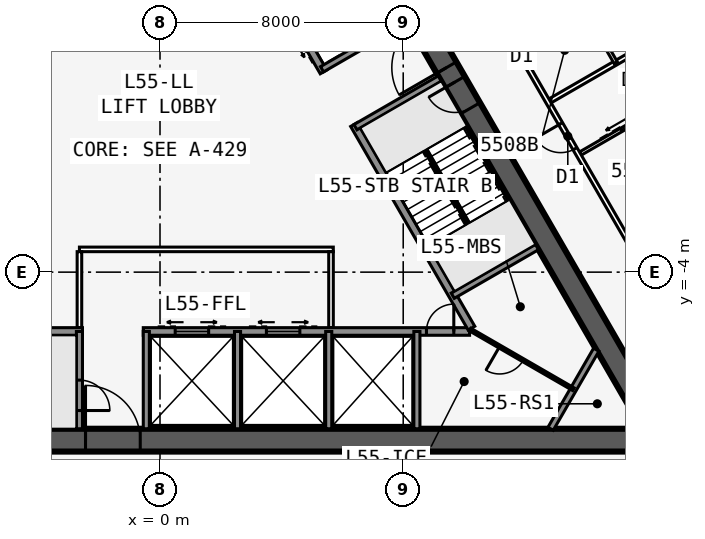
"""IFC4 building model, lengths in metres.
Left out: names, types, materials, properties, quantities, classifications, styles, units other than length and angle.
Written with IfcOpenShell. Run it as: python <this file> out.ifc"""

import sys

from ifc_helpers import new_model, si_unit, direction, frame, frame_2d, origin, place, context, subcontext, project, spatial, rectangle, extrude, element, fill, save


model = new_model("IFC4")
c1 = context("Model", 3, precision=1e-05, world=origin(), true_north=direction((0.0, 1.0)))
c2 = subcontext(c1, "Body", "Model", "MODEL_VIEW")
j1 = project(units=[si_unit("LENGTHUNIT", "METRE"), si_unit("PLANEANGLEUNIT", "RADIAN")], contexts=[c1])
p1 = place(None, origin())
s1 = spatial("IfcSite", under=j1, at=p1, CompositionType="ELEMENT")
p2 = place(p1, origin())
s2 = spatial("IfcBuilding", under=s1, at=p2, CompositionType="ELEMENT")
p3 = place(p2, frame((0.0, 0.0, 208.1)))
s3 = spatial("IfcBuildingStorey", under=s2, at=p3, CompositionType="ELEMENT", Elevation=208.1)
p4 = place(p3, frame((-16.5, -9.526, 0.0), z_axis=(0.0, 0.0, 1.0), x_axis=(1.0, 0.0, 0.0)))
e1 = element("IfcWall", 1, at=p4, inside=s3, PredefinedType="SHEAR", context=c2, shape_type="SweptSolid", body=[
    extrude(rectangle(XDim=33.0, YDim=0.75, at=frame_2d((16.5, 0.0))), origin(), (0.0, 0.0, 1.0), 3.6),
])
p5 = place(p4, frame((14.05, 0.0, 0.0)))
e2 = element("IfcOpeningElement", 2, at=p5, cuts=e1, PredefinedType="OPENING", context=c2, shape_type="SweptSolid", body=[
    extrude(rectangle(XDim=1.8, YDim=2.13, at=frame_2d((0.9, 1.065))), frame((0.0, 0.385, 0.0), z_axis=(0.0, -1.0, 0.0), x_axis=(1.0, 0.0, 0.0)), (0.0, 0.0, 1.0), 0.77),
])
p6 = place(p3, frame((-10.183, -5.951, 0.0), z_axis=(0.0, 0.0, 1.0), x_axis=(1.0, 0.0, 0.0)))
e3 = element("IfcWall", 3, at=p6, inside=s3, PredefinedType="SOLIDWALL", context=c2, shape_type="SweptSolid", body=[
    extrude(rectangle(XDim=7.633, YDim=0.25, at=frame_2d((3.816, 0.0))), origin(), (0.0, 0.0, 1.0), 3.435),
])
p7 = place(p3, frame((-0.55, -5.951, 0.0), z_axis=(0.0, 0.0, 1.0), x_axis=(1.0, 0.0, 0.0)))
e4 = element("IfcWall", 4, at=p7, inside=s3, PredefinedType="SOLIDWALL", context=c2, shape_type="SweptSolid", body=[
    extrude(rectangle(XDim=10.733, YDim=0.25, at=frame_2d((5.366, 0.0))), origin(), (0.0, 0.0, 1.0), 3.435),
])
p8 = place(p7, frame((9.314, 0.0, 0.0)))
e5 = element("IfcOpeningElement", 5, at=p8, cuts=e4, PredefinedType="OPENING", context=c2, shape_type="SweptSolid", body=[
    extrude(rectangle(XDim=0.9, YDim=2.13, at=frame_2d((0.45, 1.065))), frame((0.0, 0.135, 0.0), z_axis=(0.0, -1.0, 0.0), x_axis=(1.0, 0.0, 0.0)), (0.0, 0.0, 1.0), 0.27),
])
p9 = place(p7, frame((1.05, 0.0, 0.0)))
e6 = element("IfcOpeningElement", 6, at=p9, cuts=e4, PredefinedType="OPENING", context=c2, shape_type="SweptSolid", body=[
    extrude(rectangle(XDim=1.1, YDim=2.13, at=frame_2d((0.55, 1.065))), frame((0.0, 0.135, 0.0), z_axis=(0.0, -1.0, 0.0), x_axis=(1.0, 0.0, 0.0)), (0.0, 0.0, 1.0), 0.27),
])
p10 = place(p7, frame((4.05, 0.0, 0.0)))
e7 = element("IfcOpeningElement", 7, at=p10, cuts=e4, PredefinedType="OPENING", context=c2, shape_type="SweptSolid", body=[
    extrude(rectangle(XDim=1.1, YDim=2.13, at=frame_2d((0.55, 1.065))), frame((0.0, 0.135, 0.0), z_axis=(0.0, -1.0, 0.0), x_axis=(1.0, 0.0, 0.0)), (0.0, 0.0, 1.0), 0.27),
])
p11 = place(p3, frame((-2.65, -5.951, 0.0), z_axis=(0.0, 0.0, 1.0), x_axis=(0.0, -1.0, 0.0)))
e8 = element("IfcWall", 8, at=p11, inside=s3, PredefinedType="SOLIDWALL", context=c2, shape_type="SweptSolid", body=[
    extrude(rectangle(XDim=3.2, YDim=0.2, at=frame_2d((1.6, 0.0))), origin(), (0.0, 0.0, 1.0), 3.435),
])
p12 = place(p11, frame((1.6, 0.0, 0.0)))
e9 = element("IfcOpeningElement", 9, at=p12, cuts=e8, PredefinedType="OPENING", context=c2, shape_type="SweptSolid", body=[
    extrude(rectangle(XDim=1.0, YDim=2.13, at=frame_2d((0.5, 1.065))), frame((0.0, 0.11, 0.0), z_axis=(0.0, -1.0, 0.0), x_axis=(1.0, 0.0, 0.0)), (0.0, 0.0, 1.0), 0.22),
])
for number, where, z_axis, x_axis in (
    (10, (-0.45, -5.951, 0.0), (0.0, 0.0, 1.0), (0.0, -1.0, 0.0)),
    (11, (2.55, -5.951, 0.0), (0.0, 0.0, 1.0), (0.0, -1.0, 0.0)),
    (12, (5.55, -5.951, 0.0), (0.0, 0.0, 1.0), (0.0, -1.0, 0.0)),
    (13, (8.45, -5.951, 0.0), (0.0, 0.0, 1.0), (0.0, -1.0, 0.0)),
):
    element("IfcWall", number, at=place(p3, frame(where, z_axis=z_axis, x_axis=x_axis)), inside=s3, PredefinedType="SOLIDWALL", context=c2, shape_type="SweptSolid", body=[
        extrude(rectangle(XDim=3.2, YDim=0.2, at=frame_2d((1.6, 0.0))), origin(), (0.0, 0.0, 1.0), 3.435),
    ])
p13 = place(p3, frame((16.5, -9.526, 0.0), z_axis=(0.0, 0.0, 1.0), x_axis=(-0.499999749417, 0.866025548458, 0.0)))
e14 = element("IfcWall", 14, at=p13, inside=s3, PredefinedType="SHEAR", context=c2, shape_type="SweptSolid", body=[
    extrude(rectangle(XDim=33.0, YDim=0.75, at=frame_2d((16.5, 0.0))), origin(), (0.0, 0.0, 1.0), 3.6),
])
p14 = place(p13, frame((14.15, 0.0, 0.0)))
e15 = element("IfcOpeningElement", 15, at=p14, cuts=e14, PredefinedType="OPENING", context=c2, shape_type="SweptSolid", body=[
    extrude(rectangle(XDim=1.8, YDim=2.13, at=frame_2d((0.9, 1.065))), frame((0.0, 0.385, 0.0), z_axis=(0.0, -1.0, 0.0), x_axis=(1.0, 0.0, 0.0)), (0.0, 0.0, 1.0), 0.77),
])
p15 = place(p13, frame((12.6, 0.0, 0.0)))
e16 = element("IfcOpeningElement", 16, at=p15, cuts=e14, PredefinedType="OPENING", context=c2, shape_type="SweptSolid", body=[
    extrude(rectangle(XDim=1.0, YDim=2.13, at=frame_2d((0.5, 1.065))), frame((0.0, 0.385, 0.0), z_axis=(0.0, -1.0, 0.0), x_axis=(1.0, 0.0, 0.0)), (0.0, 0.0, 1.0), 0.77),
])
p16 = place(p3, frame((10.245, -5.843, 0.0), z_axis=(0.0, 0.0, 1.0), x_axis=(-0.499993009313, 0.866029439822, 0.0)))
e17 = element("IfcWall", 17, at=p16, inside=s3, PredefinedType="SOLIDWALL", context=c2, shape_type="SweptSolid", body=[
    extrude(rectangle(XDim=7.733, YDim=0.25, at=frame_2d((3.866, 0.0))), origin(), (0.0, 0.0, 1.0), 3.435),
])
p17 = place(p3, frame((5.379, 2.586, 0.0), z_axis=(0.0, 0.0, 1.0), x_axis=(-0.500001375892, 0.866024609411, 0.0)))
e18 = element("IfcWall", 18, at=p17, inside=s3, PredefinedType="SOLIDWALL", context=c2, shape_type="SweptSolid", body=[
    extrude(rectangle(XDim=10.633, YDim=0.25, at=frame_2d((5.316, 0.0))), origin(), (0.0, 0.0, 1.0), 3.435),
])
p18 = place(p17, frame((9.164, 0.0, 0.0)))
e19 = element("IfcOpeningElement", 19, at=p18, cuts=e18, PredefinedType="OPENING", context=c2, shape_type="SweptSolid", body=[
    extrude(rectangle(XDim=0.9, YDim=2.13, at=frame_2d((0.45, 1.065))), frame((0.0, 0.135, 0.0), z_axis=(0.0, -1.0, 0.0), x_axis=(1.0, 0.0, 0.0)), (0.0, 0.0, 1.0), 0.27),
])
p19 = place(p17, frame((1.0, 0.0, 0.0)))
e20 = element("IfcOpeningElement", 20, at=p19, cuts=e18, PredefinedType="OPENING", context=c2, shape_type="SweptSolid", body=[
    extrude(rectangle(XDim=1.1, YDim=2.13, at=frame_2d((0.55, 1.065))), frame((0.0, 0.135, 0.0), z_axis=(0.0, -1.0, 0.0), x_axis=(1.0, 0.0, 0.0)), (0.0, 0.0, 1.0), 0.27),
])
p20 = place(p17, frame((3.9, 0.0, 0.0)))
e21 = element("IfcOpeningElement", 21, at=p20, cuts=e18, PredefinedType="OPENING", context=c2, shape_type="SweptSolid", body=[
    extrude(rectangle(XDim=1.1, YDim=2.13, at=frame_2d((0.55, 1.065))), frame((0.0, 0.135, 0.0), z_axis=(0.0, -1.0, 0.0), x_axis=(1.0, 0.0, 0.0)), (0.0, 0.0, 1.0), 0.27),
])
p21 = place(p17, frame((6.8, 0.0, 0.0)))
e22 = element("IfcOpeningElement", 22, at=p21, cuts=e18, PredefinedType="OPENING", context=c2, shape_type="SweptSolid", body=[
    extrude(rectangle(XDim=1.1, YDim=2.13, at=frame_2d((0.55, 1.065))), frame((0.0, 0.135, 0.0), z_axis=(0.0, -1.0, 0.0), x_axis=(1.0, 0.0, 0.0)), (0.0, 0.0, 1.0), 0.27),
])
for number, where, z_axis, x_axis in (
    (23, (9.629, -4.775, 0.0), (0.0, 0.0, 1.0), (0.866, 0.5, 0.0)),
    (24, (6.429, 0.767, 0.0), (0.0, 0.0, 1.0), (0.866, 0.5, 0.0)),
):
    element("IfcWall", number, at=place(p3, frame(where, z_axis=z_axis, x_axis=x_axis)), inside=s3, PredefinedType="SOLIDWALL", context=c2, shape_type="SweptSolid", body=[
        extrude(rectangle(XDim=3.2, YDim=0.2, at=frame_2d((1.6, 0.0))), origin(), (0.0, 0.0, 1.0), 3.435),
    ])
p22 = place(p3, frame((5.329, 2.673, 0.0), z_axis=(0.0, 0.0, 1.0), x_axis=(0.866022944154, 0.50000426018, 0.0)))
e25 = element("IfcWall", 25, at=p22, inside=s3, PredefinedType="SOLIDWALL", context=c2, shape_type="SweptSolid", body=[
    extrude(rectangle(XDim=3.2, YDim=0.2, at=frame_2d((1.6, 0.0))), origin(), (0.0, 0.0, 1.0), 3.435),
])
p23 = place(p3, frame((0.0, 19.052, 0.0), z_axis=(0.0, 0.0, 1.0), x_axis=(-0.499999749417, -0.866025548458, 0.0)))
e26 = element("IfcWall", 26, at=p23, inside=s3, PredefinedType="SHEAR", context=c2, shape_type="SweptSolid", body=[
    extrude(rectangle(XDim=33.0, YDim=0.75, at=frame_2d((16.5, 0.0))), origin(), (0.0, 0.0, 1.0), 3.6),
])
p24 = place(p23, frame((14.15, 0.0, 0.0)))
e27 = element("IfcOpeningElement", 27, at=p24, cuts=e26, PredefinedType="OPENING", context=c2, shape_type="SweptSolid", body=[
    extrude(rectangle(XDim=1.8, YDim=2.13, at=frame_2d((0.9, 1.065))), frame((0.0, 0.385, 0.0), z_axis=(0.0, -1.0, 0.0), x_axis=(1.0, 0.0, 0.0)), (0.0, 0.0, 1.0), 0.77),
])
p25 = place(p23, frame((12.6, 0.0, 0.0)))
e28 = element("IfcOpeningElement", 28, at=p25, cuts=e26, PredefinedType="OPENING", context=c2, shape_type="SweptSolid", body=[
    extrude(rectangle(XDim=1.0, YDim=2.13, at=frame_2d((0.5, 1.065))), frame((0.0, 0.385, 0.0), z_axis=(0.0, -1.0, 0.0), x_axis=(1.0, 0.0, 0.0)), (0.0, 0.0, 1.0), 0.77),
])
p26 = place(p3, frame((20.102, -11.115, 0.0), z_axis=(0.0, 0.0, 1.0), x_axis=(-0.500000265775, 0.866025250339, 0.0)))
e29 = element("IfcWall", 29, at=p26, inside=s3, PredefinedType="PARTITIONING", context=c2, shape_type="SweptSolid", body=[
    extrude(rectangle(XDim=39.354, YDim=0.15, at=frame_2d((19.677, 0.0))), origin(), (0.0, 0.0, 1.0), 3.435),
])
p27 = place(p26, frame((1.665, 0.0, 0.0)))
e30 = element("IfcOpeningElement", 30, at=p27, cuts=e29, PredefinedType="OPENING", context=c2, shape_type="SweptSolid", body=[
    extrude(rectangle(XDim=0.95, YDim=2.13, at=frame_2d((0.475, 1.065))), frame((0.0, 0.085, 0.0), z_axis=(0.0, -1.0, 0.0), x_axis=(1.0, 0.0, 0.0)), (0.0, 0.0, 1.0), 0.17),
])
p28 = place(p26, frame((12.902, 0.0, 0.0)))
e31 = element("IfcOpeningElement", 31, at=p28, cuts=e29, PredefinedType="OPENING", context=c2, shape_type="SweptSolid", body=[
    extrude(rectangle(XDim=0.95, YDim=2.13, at=frame_2d((0.475, 1.065))), frame((0.0, 0.085, 0.0), z_axis=(0.0, -1.0, 0.0), x_axis=(1.0, 0.0, 0.0)), (0.0, 0.0, 1.0), 0.17),
])
p29 = place(p26, frame((17.302, 0.0, 0.0)))
e32 = element("IfcOpeningElement", 32, at=p29, cuts=e29, PredefinedType="OPENING", context=c2, shape_type="SweptSolid", body=[
    extrude(rectangle(XDim=0.95, YDim=2.13, at=frame_2d((0.475, 1.065))), frame((0.0, 0.085, 0.0), z_axis=(0.0, -1.0, 0.0), x_axis=(1.0, 0.0, 0.0)), (0.0, 0.0, 1.0), 0.17),
])
p30 = place(p26, frame((22.902, 0.0, 0.0)))
e33 = element("IfcOpeningElement", 33, at=p30, cuts=e29, PredefinedType="OPENING", context=c2, shape_type="SweptSolid", body=[
    extrude(rectangle(XDim=0.95, YDim=2.13, at=frame_2d((0.475, 1.065))), frame((0.0, 0.085, 0.0), z_axis=(0.0, -1.0, 0.0), x_axis=(1.0, 0.0, 0.0)), (0.0, 0.0, 1.0), 0.17),
])
p31 = place(p26, frame((32.302, 0.0, 0.0)))
e34 = element("IfcOpeningElement", 34, at=p31, cuts=e29, PredefinedType="OPENING", context=c2, shape_type="SweptSolid", body=[
    extrude(rectangle(XDim=0.95, YDim=2.13, at=frame_2d((0.475, 1.065))), frame((0.0, 0.085, 0.0), z_axis=(0.0, -1.0, 0.0), x_axis=(1.0, 0.0, 0.0)), (0.0, 0.0, 1.0), 0.17),
])
p32 = place(p26, frame((37.302, 0.0, 0.0)))
e35 = element("IfcOpeningElement", 35, at=p32, cuts=e29, PredefinedType="OPENING", context=c2, shape_type="SweptSolid", body=[
    extrude(rectangle(XDim=0.95, YDim=2.13, at=frame_2d((0.475, 1.065))), frame((0.0, 0.085, 0.0), z_axis=(0.0, -1.0, 0.0), x_axis=(1.0, 0.0, 0.0)), (0.0, 0.0, 1.0), 0.17),
])
p33 = place(p3, frame((15.329, -2.697, 0.0), z_axis=(0.0, 0.0, 1.0), x_axis=(0.866032413668, 0.499987858329, 0.0)))
e36 = element("IfcWall", 36, at=p33, inside=s3, PredefinedType="PARTITIONING", context=c2, shape_type="SweptSolid", body=[
    extrude(rectangle(XDim=7.273, YDim=0.15, at=frame_2d((3.636, 0.0))), origin(), (0.0, 0.0, 1.0), 2.589),
])
p34 = place(p3, frame((12.829, 1.633, 0.0), z_axis=(0.0, 0.0, 1.0), x_axis=(0.866030558329, 0.49999107196, 0.0)))
e37 = element("IfcWall", 37, at=p34, inside=s3, PredefinedType="PARTITIONING", context=c2, shape_type="SweptSolid", body=[
    extrude(rectangle(XDim=7.894, YDim=0.15, at=frame_2d((3.947, 0.0))), origin(), (0.0, 0.0, 1.0), 2.589),
])
p35 = place(p3, frame((13.829, -0.099, 0.0), z_axis=(0.0, 0.0, 1.0), x_axis=(0.865997131366, 0.500048966069, 0.0)))
e38 = element("IfcWall", 38, at=p35, inside=s3, PredefinedType="PLUMBINGWALL", context=c2, shape_type="SweptSolid", body=[
    extrude(rectangle(XDim=2.74, YDim=0.12, at=frame_2d((1.37, 0.0))), origin(), (0.0, 0.0, 1.0), 3.435),
])
p36 = place(p35, frame((1.55, 0.0, 0.0)))
e39 = element("IfcOpeningElement", 39, at=p36, cuts=e38, PredefinedType="OPENING", context=c2, shape_type="SweptSolid", body=[
    extrude(rectangle(XDim=0.9, YDim=2.13, at=frame_2d((0.45, 1.065))), frame((0.0, 0.07, 0.0), z_axis=(0.0, -1.0, 0.0), x_axis=(1.0, 0.0, 0.0)), (0.0, 0.0, 1.0), 0.14),
])
p37 = place(p3, frame((14.993, 2.883, 0.0), z_axis=(0.0, 0.0, 1.0), x_axis=(-0.500001309137, 0.866024647952, 0.0)))
e40 = element("IfcWall", 40, at=p37, inside=s3, PredefinedType="PLUMBINGWALL", context=c2, shape_type="SweptSolid", body=[
    extrude(rectangle(XDim=2.4, YDim=0.12, at=frame_2d((1.2, 0.0))), origin(), (0.0, 0.0, 1.0), 3.435),
])
p38 = place(p3, frame((-0.425, 22.966, 0.0), z_axis=(0.0, 0.0, 1.0), x_axis=(-0.500000265775, -0.866025250339, 0.0)))
e41 = element("IfcWall", 41, at=p38, inside=s3, PredefinedType="PARTITIONING", context=c2, shape_type="SweptSolid", body=[
    extrude(rectangle(XDim=39.354, YDim=0.15, at=frame_2d((19.677, 0.0))), origin(), (0.0, 0.0, 1.0), 3.435),
])
p39 = place(p38, frame((1.102, 0.0, 0.0)))
e42 = element("IfcOpeningElement", 42, at=p39, cuts=e41, PredefinedType="OPENING", context=c2, shape_type="SweptSolid", body=[
    extrude(rectangle(XDim=0.95, YDim=2.13, at=frame_2d((0.475, 1.065))), frame((0.0, 0.085, 0.0), z_axis=(0.0, -1.0, 0.0), x_axis=(1.0, 0.0, 0.0)), (0.0, 0.0, 1.0), 0.17),
])
p40 = place(p38, frame((7.902, 0.0, 0.0)))
e43 = element("IfcOpeningElement", 43, at=p40, cuts=e41, PredefinedType="OPENING", context=c2, shape_type="SweptSolid", body=[
    extrude(rectangle(XDim=0.95, YDim=2.13, at=frame_2d((0.475, 1.065))), frame((0.0, 0.085, 0.0), z_axis=(0.0, -1.0, 0.0), x_axis=(1.0, 0.0, 0.0)), (0.0, 0.0, 1.0), 0.17),
])
p41 = place(p38, frame((17.302, 0.0, 0.0)))
e44 = element("IfcOpeningElement", 44, at=p41, cuts=e41, PredefinedType="OPENING", context=c2, shape_type="SweptSolid", body=[
    extrude(rectangle(XDim=0.95, YDim=2.13, at=frame_2d((0.475, 1.065))), frame((0.0, 0.085, 0.0), z_axis=(0.0, -1.0, 0.0), x_axis=(1.0, 0.0, 0.0)), (0.0, 0.0, 1.0), 0.17),
])
p42 = place(p38, frame((26.702, 0.0, 0.0)))
e45 = element("IfcOpeningElement", 45, at=p42, cuts=e41, PredefinedType="OPENING", context=c2, shape_type="SweptSolid", body=[
    extrude(rectangle(XDim=0.95, YDim=2.13, at=frame_2d((0.475, 1.065))), frame((0.0, 0.085, 0.0), z_axis=(0.0, -1.0, 0.0), x_axis=(1.0, 0.0, 0.0)), (0.0, 0.0, 1.0), 0.17),
])
p43 = place(p38, frame((37.302, 0.0, 0.0)))
e46 = element("IfcOpeningElement", 46, at=p43, cuts=e41, PredefinedType="OPENING", context=c2, shape_type="SweptSolid", body=[
    extrude(rectangle(XDim=0.95, YDim=2.13, at=frame_2d((0.475, 1.065))), frame((0.0, 0.085, 0.0), z_axis=(0.0, -1.0, 0.0), x_axis=(1.0, 0.0, 0.0)), (0.0, 0.0, 1.0), 0.17),
])
p44 = place(p3, frame((-2.65, -3.251, 0.0), z_axis=(0.0, 0.0, 1.0), x_axis=(1.0, 0.0, 0.0)))
e47 = element("IfcWall", 47, at=p44, inside=s3, PredefinedType="PARTITIONING", context=c2, shape_type="SweptSolid", body=[
    extrude(rectangle(XDim=8.35, YDim=0.15, at=frame_2d((4.175, 0.0))), origin(), (0.0, 0.0, 1.0), 3.435),
])
for number, where, z_axis, x_axis in (
    (48, (-2.65, -5.826, 0.0), (0.0, 0.0, 1.0), (0.0, 1.0, 0.0)),
    (49, (5.625, -5.826, 0.0), (0.0, 0.0, 1.0), (0.0, 1.0, 0.0)),
):
    element("IfcWall", number, at=place(p3, frame(where, z_axis=z_axis, x_axis=x_axis)), inside=s3, PredefinedType="PARTITIONING", context=c2, shape_type="SweptSolid", body=[
        extrude(rectangle(XDim=2.5, YDim=0.15, at=frame_2d((1.25, 0.0))), origin(), (0.0, 0.0, 1.0), 3.435),
    ])
p45 = place(p3, frame((14.349, -6.551, 0.0), z_axis=(0.0, 0.0, 1.0), x_axis=(-0.499952404951, -0.866052881055, 0.0)))
e50 = element("IfcWall", 50, at=p45, inside=s3, PredefinedType="SOLIDWALL", context=c2, shape_type="SweptSolid", body=[
    extrude(rectangle(XDim=3.002, YDim=0.2, at=frame_2d((1.501, 0.0))), origin(), (0.0, 0.0, 1.0), 3.435),
])
p46 = place(p3, frame((13.599, -7.851, 0.0), z_axis=(0.0, 0.0, 1.0), x_axis=(-0.866026081073, 0.499998826899, 0.0)))
e51 = element("IfcWall", 51, at=p46, inside=s3, PredefinedType="PARTITIONING", context=c2, shape_type="SweptSolid", body=[
    extrude(rectangle(XDim=3.925, YDim=0.1, at=frame_2d((1.963, 0.0))), origin(), (0.0, 0.0, 1.0), 3.435),
])
p47 = place(p46, frame((1.905, 0.0, 0.0)))
e52 = element("IfcOpeningElement", 52, at=p47, cuts=e51, PredefinedType="OPENING", context=c2, shape_type="SweptSolid", body=[
    extrude(rectangle(XDim=0.9, YDim=2.13, at=frame_2d((0.45, 1.065))), frame((0.0, 0.06, 0.0), z_axis=(0.0, -1.0, 0.0), x_axis=(1.0, 0.0, 0.0)), (0.0, 0.0, 1.0), 0.12),
])
p48 = place(p3, frame((10.135, -2.401, 0.0), z_axis=(0.0, 0.0, 1.0), x_axis=(-0.499992232847, 0.866029888106, 0.0)))
e53 = element("IfcWall", 53, at=p48, inside=s3, PredefinedType="SOLIDWALL", context=c2, shape_type="SweptSolid", body=[
    extrude(rectangle(XDim=2.794, YDim=0.1, at=frame_2d((1.397, 0.0))), origin(), (0.0, 0.0, 1.0), 3.6),
])
p49 = place(p36, origin())
e54 = element("IfcDoor", 54, at=p49, inside=s3, OperationType="SLIDING_TO_LEFT", PredefinedType="DOOR", context=c2, shape_type="SweptSolid", body=[
    extrude(rectangle(XDim=0.9, YDim=2.13, at=frame_2d((0.45, 1.065))), frame((0.0, 0.025, 0.0), z_axis=(0.0, -1.0, 0.0), x_axis=(1.0, 0.0, 0.0)), (0.0, 0.0, 1.0), 0.05),
])
fill(e39, e54)
p50 = place(p28, origin())
e55 = element("IfcDoor", 55, at=p50, inside=s3, OperationType="SINGLE_SWING_RIGHT", PredefinedType="DOOR", context=c2, shape_type="SweptSolid", body=[
    extrude(rectangle(XDim=0.95, YDim=2.13, at=frame_2d((0.475, 1.065))), frame((0.0, 0.025, 0.0), z_axis=(0.0, -1.0, 0.0), x_axis=(1.0, 0.0, 0.0)), (0.0, 0.0, 1.0), 0.05),
])
fill(e31, e55)
p51 = place(p5, origin())
e56 = element("IfcDoor", 56, at=p51, inside=s3, OperationType="DOUBLE_DOOR_SINGLE_SWING", PredefinedType="DOOR", context=c2, shape_type="SweptSolid", body=[
    extrude(rectangle(XDim=1.8, YDim=2.13, at=frame_2d((0.9, 1.065))), frame((0.0, 0.025, 0.0), z_axis=(0.0, -1.0, 0.0), x_axis=(1.0, 0.0, 0.0)), (0.0, 0.0, 1.0), 0.05),
])
fill(e2, e56)
p52 = place(p12, origin())
e57 = element("IfcDoor", 57, at=p52, inside=s3, OperationType="SINGLE_SWING_RIGHT", PredefinedType="DOOR", context=c2, shape_type="SweptSolid", body=[
    extrude(rectangle(XDim=1.0, YDim=2.13, at=frame_2d((0.5, 1.065))), frame((0.0, 0.025, 0.0), z_axis=(0.0, -1.0, 0.0), x_axis=(1.0, 0.0, 0.0)), (0.0, 0.0, 1.0), 0.05),
])
fill(e9, e57)
p53 = place(p14, origin())
e58 = element("IfcDoor", 58, at=p53, inside=s3, OperationType="DOUBLE_DOOR_SINGLE_SWING", PredefinedType="DOOR", context=c2, shape_type="SweptSolid", body=[
    extrude(rectangle(XDim=1.8, YDim=2.13, at=frame_2d((0.9, 1.065))), frame((0.0, 0.025, 0.0), z_axis=(0.0, -1.0, 0.0), x_axis=(1.0, 0.0, 0.0)), (0.0, 0.0, 1.0), 0.05),
])
fill(e15, e58)
p54 = place(p15, origin())
e59 = element("IfcDoor", 59, at=p54, inside=s3, OperationType="SINGLE_SWING_RIGHT", PredefinedType="DOOR", context=c2, shape_type="SweptSolid", body=[
    extrude(rectangle(XDim=1.0, YDim=2.13, at=frame_2d((0.5, 1.065))), frame((0.0, 0.025, 0.0), z_axis=(0.0, -1.0, 0.0), x_axis=(1.0, 0.0, 0.0)), (0.0, 0.0, 1.0), 0.05),
])
fill(e16, e59)
p55 = place(p8, origin())
e60 = element("IfcDoor", 60, at=p55, inside=s3, OperationType="SINGLE_SWING_RIGHT", PredefinedType="DOOR", context=c2, shape_type="SweptSolid", body=[
    extrude(rectangle(XDim=0.9, YDim=2.13, at=frame_2d((0.45, 1.065))), frame((0.0, 0.025, 0.0), z_axis=(0.0, -1.0, 0.0), x_axis=(1.0, 0.0, 0.0)), (0.0, 0.0, 1.0), 0.05),
])
fill(e5, e60)
p56 = place(p47, origin())
e61 = element("IfcDoor", 61, at=p56, inside=s3, OperationType="SINGLE_SWING_RIGHT", PredefinedType="DOOR", context=c2, shape_type="SweptSolid", body=[
    extrude(rectangle(XDim=0.9, YDim=2.13, at=frame_2d((0.45, 1.065))), frame((0.0, 0.025, 0.0), z_axis=(0.0, -1.0, 0.0), x_axis=(1.0, 0.0, 0.0)), (0.0, 0.0, 1.0), 0.05),
])
fill(e52, e61)
p57 = place(p9, origin())
e62 = element("IfcDoor", 62, at=p57, inside=s3, OperationType="DOUBLE_DOOR_SLIDING", PredefinedType="USERDEFINED", context=c2, shape_type="SweptSolid", body=[
    extrude(rectangle(XDim=1.1, YDim=2.13, at=frame_2d((0.55, 1.065))), frame((0.0, 0.025, 0.0), z_axis=(0.0, -1.0, 0.0), x_axis=(1.0, 0.0, 0.0)), (0.0, 0.0, 1.0), 0.05),
])
fill(e6, e62)
p58 = place(p10, origin())
e63 = element("IfcDoor", 63, at=p58, inside=s3, OperationType="DOUBLE_DOOR_SLIDING", PredefinedType="USERDEFINED", context=c2, shape_type="SweptSolid", body=[
    extrude(rectangle(XDim=1.1, YDim=2.13, at=frame_2d((0.55, 1.065))), frame((0.0, 0.025, 0.0), z_axis=(0.0, -1.0, 0.0), x_axis=(1.0, 0.0, 0.0)), (0.0, 0.0, 1.0), 0.05),
])
fill(e7, e63)
save(model, sys.argv[1])
